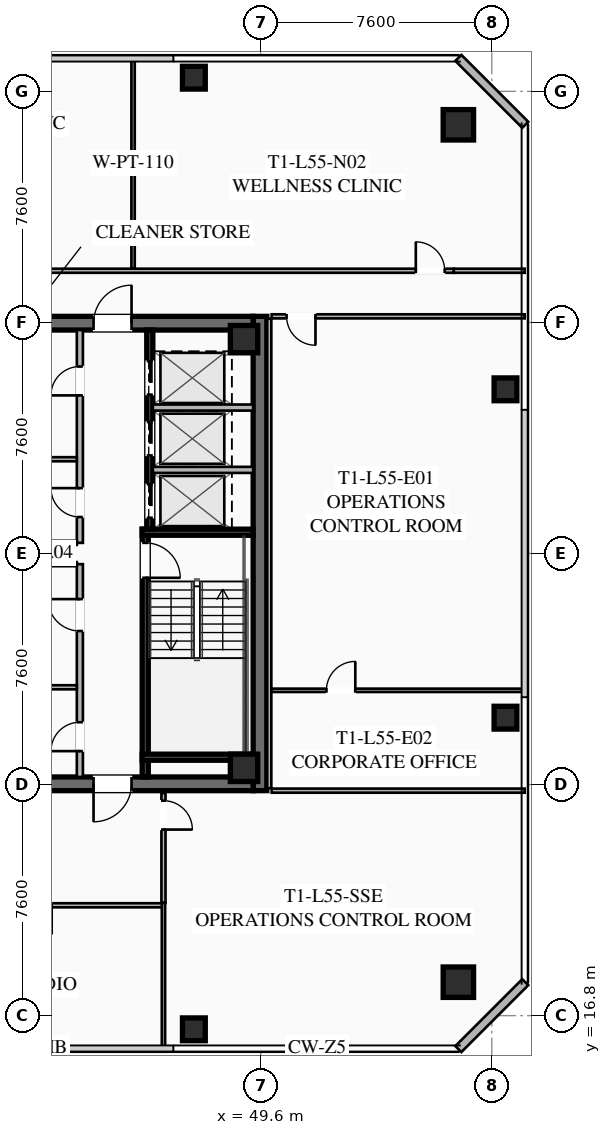
"""IFC4 building model, lengths in metres.
Left out: names, types, materials, properties, quantities, classifications, styles, units other than length and angle.
Written with IfcOpenShell. Run it as: python <this file> out.ifc"""

import sys

from ifc_helpers import new_model, si_unit, direction, frame, frame_2d, origin, origin_2d, place, context, subcontext, project, spatial, rectangle, hollow_rectangle, extrude, element, fill, save


model = new_model("IFC4")
c1 = context("Model", 3, precision=1e-05, world=origin(), true_north=direction((0.0, 1.0)))
c2 = subcontext(c1, "Body", "Model", "MODEL_VIEW")
j1 = project(units=[si_unit("LENGTHUNIT", "METRE"), si_unit("PLANEANGLEUNIT", "RADIAN")], contexts=[c1])
p1 = place(None, origin())
s1 = spatial("IfcSite", under=j1, at=p1, CompositionType="ELEMENT")
p2 = place(p1, origin())
s2 = spatial("IfcBuilding", under=s1, at=p2, CompositionType="ELEMENT")
p3 = place(p2, frame((0.0, 0.0, 204.2)))
s3 = spatial("IfcBuildingStorey", under=s2, at=p3, CompositionType="ELEMENT", Elevation=204.2)
p4 = place(p3, frame((49.575, 39.8, 0.0), z_axis=(0.0, 0.0, 1.0), x_axis=(0.0, -1.0, 0.0)))
e1 = element("IfcWall", 1, at=p4, inside=s3, PredefinedType="SHEAR", context=c2, shape_type="SweptSolid", body=[
    extrude(rectangle(XDim=15.6, YDim=0.45, at=frame_2d((7.8, 0.0))), origin(), (0.0, 0.0, 1.0), 3.55),
])
p5 = place(p3, frame((49.35, 24.425, 0.0), z_axis=(0.0, 0.0, 1.0), x_axis=(-1.0, 0.0, 0.0)))
e2 = element("IfcWall", 2, at=p5, inside=s3, PredefinedType="SHEAR", context=c2, shape_type="SweptSolid", body=[
    extrude(rectangle(XDim=14.7, YDim=0.45, at=frame_2d((7.35, 0.0))), origin(), (0.0, 0.0, 1.0), 3.55),
])
p6 = place(p5, frame((9.05, 0.0, 0.0)))
e3 = element("IfcOpeningElement", 3, at=p6, cuts=e2, PredefinedType="OPENING", context=c2, shape_type="SweptSolid", body=[
    extrude(rectangle(XDim=1.25, YDim=2.25, at=frame_2d((0.625, 1.125))), frame((0.0, 0.235, 0.0), z_axis=(0.0, -1.0, 0.0), x_axis=(1.0, 0.0, 0.0)), (0.0, 0.0, 1.0), 0.47),
])
p7 = place(p5, frame((4.0, 0.0, 0.0)))
e4 = element("IfcOpeningElement", 4, at=p7, cuts=e2, PredefinedType="OPENING", context=c2, shape_type="SweptSolid", body=[
    extrude(rectangle(XDim=1.25, YDim=2.25, at=frame_2d((0.625, 1.125))), frame((0.0, 0.235, 0.0), z_axis=(0.0, -1.0, 0.0), x_axis=(1.0, 0.0, 0.0)), (0.0, 0.0, 1.0), 0.47),
])
p8 = place(p3, frame((34.65, 39.575, 0.0), z_axis=(0.0, 0.0, 1.0), x_axis=(1.0, 0.0, 0.0)))
e5 = element("IfcWall", 5, at=p8, inside=s3, PredefinedType="SHEAR", context=c2, shape_type="SweptSolid", body=[
    extrude(rectangle(XDim=14.7, YDim=0.45, at=frame_2d((7.35, 0.0))), origin(), (0.0, 0.0, 1.0), 3.55),
])
p9 = place(p8, frame((4.4, 0.0, 0.0)))
e6 = element("IfcOpeningElement", 6, at=p9, cuts=e5, PredefinedType="OPENING", context=c2, shape_type="SweptSolid", body=[
    extrude(rectangle(XDim=1.25, YDim=2.25, at=frame_2d((0.625, 1.125))), frame((0.0, 0.235, 0.0), z_axis=(0.0, -1.0, 0.0), x_axis=(1.0, 0.0, 0.0)), (0.0, 0.0, 1.0), 0.47),
])
p10 = place(p8, frame((9.45, 0.0, 0.0)))
e7 = element("IfcOpeningElement", 7, at=p10, cuts=e5, PredefinedType="OPENING", context=c2, shape_type="SweptSolid", body=[
    extrude(rectangle(XDim=1.25, YDim=2.25, at=frame_2d((0.625, 1.125))), frame((0.0, 0.235, 0.0), z_axis=(0.0, -1.0, 0.0), x_axis=(1.0, 0.0, 0.0)), (0.0, 0.0, 1.0), 0.47),
])
for number, where, z_axis, x_axis in (
    (8, (49.05, 24.95, 0.0), (0.0, 0.0, 1.0), (1.0, 0.0, 0.0)),
    (9, (49.05, 39.05, 0.0), (0.0, 0.0, 1.0), (1.0, 0.0, 0.0)),
):
    element("IfcColumn", number, at=place(p3, frame(where, z_axis=z_axis, x_axis=x_axis)), inside=s3, PredefinedType="COLUMN", context=c2, shape_type="SweptSolid", body=[
        extrude(hollow_rectangle(XDim=0.9, YDim=0.9, WallThickness=0.04, at=origin_2d()), origin(), (0.0, 0.0, 1.0), 3.37),
    ])
for number, where, z_axis, x_axis in (
    (10, (56.1, 17.9, 0.0), (0.0, 0.0, 1.0), (1.0, 0.0, 0.0)),
    (11, (56.1, 46.1, 0.0), (0.0, 0.0, 1.0), (1.0, 0.0, 0.0)),
):
    element("IfcColumn", number, at=place(p3, frame(where, z_axis=z_axis, x_axis=x_axis)), inside=s3, PredefinedType="COLUMN", context=c2, shape_type="SweptSolid", body=[
        extrude(hollow_rectangle(XDim=1.0, YDim=1.0, WallThickness=0.04, at=origin_2d()), origin(), (0.0, 0.0, 1.0), 3.37),
    ])
for number, where, z_axis, x_axis in (
    (12, (47.4, 16.35, 0.0), (0.0, 0.0, 1.0), (1.0, 0.0, 0.0)),
    (13, (57.65, 26.6, 0.0), (0.0, 0.0, 1.0), (1.0, 0.0, 0.0)),
    (14, (57.65, 37.4, 0.0), (0.0, 0.0, 1.0), (1.0, 0.0, 0.0)),
    (15, (47.4, 47.65, 0.0), (0.0, 0.0, 1.0), (1.0, 0.0, 0.0)),
):
    element("IfcColumn", number, at=place(p3, frame(where, z_axis=z_axis, x_axis=x_axis)), inside=s3, PredefinedType="COLUMN", context=c2, shape_type="SweptSolid", body=[
        extrude(hollow_rectangle(XDim=0.75, YDim=0.75, WallThickness=0.032, at=origin_2d()), origin(), (0.0, 0.0, 1.0), 3.37),
    ])
for number, where, z_axis, x_axis in (
    (16, (56.1, 48.3, 0.0), (0.0, 0.0, 1.0), (0.707, -0.707, 0.0)),
    (17, (58.3, 17.9, 0.0), (0.0, 0.0, 1.0), (-0.707, -0.707, 0.0)),
):
    element("IfcWall", number, at=place(p3, frame(where, z_axis=z_axis, x_axis=x_axis)), inside=s3, PredefinedType="SOLIDWALL", context=c2, shape_type="SweptSolid", body=[
        extrude(rectangle(XDim=3.111, YDim=0.28, at=frame_2d((1.556, 0.0))), origin(), (0.0, 0.0, 1.0), 3.37),
    ])
p11 = place(p3, frame((45.8, 32.8, 0.0), z_axis=(0.0, 0.0, 1.0), x_axis=(0.0, -1.0, 0.0)))
e18 = element("IfcWall", 18, at=p11, inside=s3, PredefinedType="SHEAR", context=c2, shape_type="SweptSolid", body=[
    extrude(rectangle(XDim=8.15, YDim=0.2, at=frame_2d((4.075, 0.0))), origin(), (0.0, 0.0, 1.0), 3.37),
])
p12 = place(p11, frame((0.45, 0.0, 0.0)))
e19 = element("IfcOpeningElement", 19, at=p12, cuts=e18, PredefinedType="OPENING", context=c2, shape_type="SweptSolid", body=[
    extrude(rectangle(XDim=1.15, YDim=2.2, at=frame_2d((0.575, 1.1))), frame((0.0, 0.11, 0.0), z_axis=(0.0, -1.0, 0.0), x_axis=(1.0, 0.0, 0.0)), (0.0, 0.0, 1.0), 0.22),
])
for number, where, z_axis, x_axis in (
    (20, (45.7, 32.7, 0.0), (0.0, 0.0, 1.0), (1.0, 0.0, 0.0)),
    (21, (45.7, 25.3, 0.0), (0.0, 0.0, 1.0), (1.0, 0.0, 0.0)),
):
    element("IfcWall", number, at=place(p3, frame(where, z_axis=z_axis, x_axis=x_axis)), inside=s3, PredefinedType="SHEAR", context=c2, shape_type="SweptSolid", body=[
        extrude(rectangle(XDim=3.65, YDim=0.2, at=frame_2d((1.825, 0.0))), origin(), (0.0, 0.0, 1.0), 3.37),
    ])
p13 = place(p3, frame((45.95, 39.35, 0.0), z_axis=(0.0, 0.0, 1.0), x_axis=(0.0, -1.0, 0.0)))
e22 = element("IfcWall", 22, at=p13, inside=s3, PredefinedType="SHEAR", context=c2, shape_type="SweptSolid", body=[
    extrude(rectangle(XDim=6.55, YDim=0.2, at=frame_2d((3.275, 0.0))), origin(), (0.0, 0.0, 1.0), 3.37),
])
p14 = place(p13, frame((5.075, 0.0, 0.0)))
e23 = element("IfcOpeningElement", 23, at=p14, cuts=e22, PredefinedType="OPENING", context=c2, shape_type="SweptSolid", body=[
    extrude(rectangle(XDim=1.1, YDim=2.2, at=frame_2d((0.55, 1.1))), frame((0.0, 0.11, 0.0), z_axis=(0.0, -1.0, 0.0), x_axis=(1.0, 0.0, 0.0)), (0.0, 0.0, 1.0), 0.22),
])
p15 = place(p13, frame((3.025, 0.0, 0.0)))
e24 = element("IfcOpeningElement", 24, at=p15, cuts=e22, PredefinedType="OPENING", context=c2, shape_type="SweptSolid", body=[
    extrude(rectangle(XDim=1.1, YDim=2.2, at=frame_2d((0.55, 1.1))), frame((0.0, 0.11, 0.0), z_axis=(0.0, -1.0, 0.0), x_axis=(1.0, 0.0, 0.0)), (0.0, 0.0, 1.0), 0.22),
])
p16 = place(p13, frame((1.025, 0.0, 0.0)))
e25 = element("IfcOpeningElement", 25, at=p16, cuts=e22, PredefinedType="OPENING", context=c2, shape_type="SweptSolid", body=[
    extrude(rectangle(XDim=1.1, YDim=2.2, at=frame_2d((0.55, 1.1))), frame((0.0, 0.11, 0.0), z_axis=(0.0, -1.0, 0.0), x_axis=(1.0, 0.0, 0.0)), (0.0, 0.0, 1.0), 0.22),
])
for number, where, z_axis, x_axis in (
    (26, (46.05, 34.75, 0.0), (0.0, 0.0, 1.0), (1.0, 0.0, 0.0)),
    (27, (46.05, 36.8, 0.0), (0.0, 0.0, 1.0), (1.0, 0.0, 0.0)),
):
    element("IfcWall", number, at=place(p3, frame(where, z_axis=z_axis, x_axis=x_axis)), inside=s3, PredefinedType="SOLIDWALL", context=c2, shape_type="SweptSolid", body=[
        extrude(rectangle(XDim=3.3, YDim=0.2, at=frame_2d((1.65, 0.0))), origin(), (0.0, 0.0, 1.0), 3.37),
    ])
p17 = place(p3, frame((43.65, 24.65, 0.0), z_axis=(0.0, 0.0, 1.0), x_axis=(0.0, 1.0, 0.0)))
e28 = element("IfcWall", 28, at=p17, inside=s3, PredefinedType="SOLIDWALL", context=c2, shape_type="SweptSolid", body=[
    extrude(rectangle(XDim=7.0, YDim=0.2, at=frame_2d((3.5, 0.0))), origin(), (0.0, 0.0, 1.0), 2.723),
])
p18 = place(p17, frame((0.85, 0.0, 0.0)))
e29 = element("IfcOpeningElement", 29, at=p18, cuts=e28, PredefinedType="OPENING", context=c2, shape_type="SweptSolid", body=[
    extrude(rectangle(XDim=0.95, YDim=2.05, at=frame_2d((0.475, 1.025))), frame((0.0, 0.11, 0.0), z_axis=(0.0, -1.0, 0.0), x_axis=(1.0, 0.0, 0.0)), (0.0, 0.0, 1.0), 0.22),
])
p19 = place(p17, frame((4.8, 0.0, 0.0)))
e30 = element("IfcOpeningElement", 30, at=p19, cuts=e28, PredefinedType="OPENING", context=c2, shape_type="SweptSolid", body=[
    extrude(rectangle(XDim=1.05, YDim=2.2, at=frame_2d((0.525, 1.1))), frame((0.0, 0.11, 0.0), z_axis=(0.0, -1.0, 0.0), x_axis=(1.0, 0.0, 0.0)), (0.0, 0.0, 1.0), 0.22),
])
for number, where, z_axis, x_axis in (
    (31, (41.67, 31.65, 0.0), (0.0, 0.0, 1.0), (1.0, 0.0, 0.0)),
    (32, (41.67, 27.6, 0.0), (0.0, 0.0, 1.0), (1.0, 0.0, 0.0)),
):
    element("IfcWall", number, at=place(p3, frame(where, z_axis=z_axis, x_axis=x_axis)), inside=s3, PredefinedType="PARTITIONING", context=c2, shape_type="SweptSolid", body=[
        extrude(rectangle(XDim=1.88, YDim=0.135, at=frame_2d((0.94, 0.0))), origin(), (0.0, 0.0, 1.0), 2.723),
    ])
p20 = place(p3, frame((43.65, 32.35, 0.0), z_axis=(0.0, 0.0, 1.0), x_axis=(0.0, 1.0, 0.0)))
e33 = element("IfcWall", 33, at=p20, inside=s3, PredefinedType="SOLIDWALL", context=c2, shape_type="SweptSolid", body=[
    extrude(rectangle(XDim=7.0, YDim=0.2, at=frame_2d((3.5, 0.0))), origin(), (0.0, 0.0, 1.0), 2.723),
])
p21 = place(p20, frame((0.85, 0.0, 0.0)))
e34 = element("IfcOpeningElement", 34, at=p21, cuts=e33, PredefinedType="OPENING", context=c2, shape_type="SweptSolid", body=[
    extrude(rectangle(XDim=0.95, YDim=2.05, at=frame_2d((0.475, 1.025))), frame((0.0, 0.11, 0.0), z_axis=(0.0, -1.0, 0.0), x_axis=(1.0, 0.0, 0.0)), (0.0, 0.0, 1.0), 0.22),
])
p22 = place(p20, frame((4.85, 0.0, 0.0)))
e35 = element("IfcOpeningElement", 35, at=p22, cuts=e33, PredefinedType="OPENING", context=c2, shape_type="SweptSolid", body=[
    extrude(rectangle(XDim=0.95, YDim=2.05, at=frame_2d((0.475, 1.025))), frame((0.0, 0.11, 0.0), z_axis=(0.0, -1.0, 0.0), x_axis=(1.0, 0.0, 0.0)), (0.0, 0.0, 1.0), 0.22),
])
for number, where, z_axis, x_axis in (
    (36, (41.67, 32.35, 0.0), (0.0, 0.0, 1.0), (1.0, 0.0, 0.0)),
    (37, (41.67, 35.1, 0.0), (0.0, 0.0, 1.0), (1.0, 0.0, 0.0)),
):
    element("IfcWall", number, at=place(p3, frame(where, z_axis=z_axis, x_axis=x_axis)), inside=s3, PredefinedType="PARTITIONING", context=c2, shape_type="SweptSolid", body=[
        extrude(rectangle(XDim=1.88, YDim=0.135, at=frame_2d((0.94, 0.0))), origin(), (0.0, 0.0, 1.0), 2.723),
    ])
p23 = place(p3, frame((28.05, 41.3, 0.0), z_axis=(0.0, 0.0, 1.0), x_axis=(1.0, 0.0, 0.0)))
e38 = element("IfcWall", 38, at=p23, inside=s3, PredefinedType="PARTITIONING", context=c2, shape_type="SweptSolid", body=[
    extrude(rectangle(XDim=27.9, YDim=0.135, at=frame_2d((13.95, 0.0))), origin(), (0.0, 0.0, 1.0), 2.723),
])
p24 = place(p23, frame((0.3, 0.0, 0.0)))
e39 = element("IfcOpeningElement", 39, at=p24, cuts=e38, PredefinedType="OPENING", context=c2, shape_type="SweptSolid", body=[
    extrude(rectangle(XDim=0.95, YDim=2.05, at=frame_2d((0.475, 1.025))), frame((0.0, 0.077, 0.0), z_axis=(0.0, -1.0, 0.0), x_axis=(1.0, 0.0, 0.0)), (0.0, 0.0, 1.0), 0.155),
])
p25 = place(p23, frame((26.65, 0.0, 0.0)))
e40 = element("IfcOpeningElement", 40, at=p25, cuts=e38, PredefinedType="OPENING", context=c2, shape_type="SweptSolid", body=[
    extrude(rectangle(XDim=0.95, YDim=2.05, at=frame_2d((0.475, 1.025))), frame((0.0, 0.077, 0.0), z_axis=(0.0, -1.0, 0.0), x_axis=(1.0, 0.0, 0.0)), (0.0, 0.0, 1.0), 0.155),
])
p26 = place(p3, frame((55.95, 41.3, 0.0), z_axis=(0.0, 0.0, 1.0), x_axis=(1.0, 0.0, 0.0)))
e41 = element("IfcWall", 41, at=p26, inside=s3, PredefinedType="PARTITIONING", context=c2, shape_type="SweptSolid", body=[
    extrude(rectangle(XDim=2.33, YDim=0.135, at=frame_2d((1.165, 0.0))), origin(), (0.0, 0.0, 1.0), 2.723),
])
p27 = place(p3, frame((45.4, 41.38, 0.0), z_axis=(0.0, 0.0, 1.0), x_axis=(0.0, 1.0, 0.0)))
e42 = element("IfcWall", 42, at=p27, inside=s3, PredefinedType="PARTITIONING", context=c2, shape_type="SweptSolid", body=[
    extrude(rectangle(XDim=6.9, YDim=0.11, at=frame_2d((3.45, 0.0))), origin(), (0.0, 0.0, 1.0), 2.723),
])
p28 = place(p3, frame((46.4, 20.43, 0.0), z_axis=(0.0, 0.0, 1.0), x_axis=(-1.0, 0.0, 0.0)))
e43 = element("IfcWall", 43, at=p28, inside=s3, PredefinedType="PARTITIONING", context=c2, shape_type="SweptSolid", body=[
    extrude(rectangle(XDim=18.35, YDim=0.135, at=frame_2d((9.175, 0.0))), origin(), (0.0, 0.0, 1.0), 2.723),
])
p29 = place(p28, frame((17.02, 0.0, 0.0)))
e44 = element("IfcOpeningElement", 44, at=p29, cuts=e43, PredefinedType="OPENING", context=c2, shape_type="SweptSolid", body=[
    extrude(rectangle(XDim=0.95, YDim=2.05, at=frame_2d((0.475, 1.025))), frame((0.0, 0.077, 0.0), z_axis=(0.0, -1.0, 0.0), x_axis=(1.0, 0.0, 0.0)), (0.0, 0.0, 1.0), 0.155),
])
p30 = place(p28, frame((3.677, 0.0, 0.0)))
e45 = element("IfcOpeningElement", 45, at=p30, cuts=e43, PredefinedType="OPENING", context=c2, shape_type="SweptSolid", body=[
    extrude(rectangle(XDim=0.95, YDim=2.05, at=frame_2d((0.475, 1.025))), frame((0.0, 0.077, 0.0), z_axis=(0.0, -1.0, 0.0), x_axis=(1.0, 0.0, 0.0)), (0.0, 0.0, 1.0), 0.155),
])
p31 = place(p3, frame((46.4, 24.12, 0.0), z_axis=(0.0, 0.0, 1.0), x_axis=(0.0, -1.0, 0.0)))
e46 = element("IfcWall", 46, at=p31, inside=s3, PredefinedType="PARTITIONING", context=c2, shape_type="SweptSolid", body=[
    extrude(rectangle(XDim=3.61, YDim=0.135, at=frame_2d((1.805, 0.0))), origin(), (0.0, 0.0, 1.0), 2.723),
])
p32 = place(p31, frame((0.25, 0.0, 0.0)))
e47 = element("IfcOpeningElement", 47, at=p32, cuts=e46, PredefinedType="OPENING", context=c2, shape_type="SweptSolid", body=[
    extrude(rectangle(XDim=0.95, YDim=2.05, at=frame_2d((0.475, 1.025))), frame((0.0, 0.077, 0.0), z_axis=(0.0, -1.0, 0.0), x_axis=(1.0, 0.0, 0.0)), (0.0, 0.0, 1.0), 0.155),
])
p33 = place(p3, frame((46.4, 15.72, 0.0), z_axis=(0.0, 0.0, 1.0), x_axis=(0.0, 1.0, 0.0)))
e48 = element("IfcWall", 48, at=p33, inside=s3, PredefinedType="PARTITIONING", context=c2, shape_type="SweptSolid", body=[
    extrude(rectangle(XDim=4.79, YDim=0.11, at=frame_2d((2.395, 0.0))), origin(), (0.0, 0.0, 1.0), 2.723),
])
p34 = place(p3, frame((49.88, 39.72, 0.0), z_axis=(0.0, 0.0, 1.0), x_axis=(0.0, -1.0, 0.0)))
e49 = element("IfcWall", 49, at=p34, inside=s3, PredefinedType="PARTITIONING", context=c2, shape_type="SweptSolid", body=[
    extrude(rectangle(XDim=15.44, YDim=0.135, at=frame_2d((7.72, 0.0))), origin(), (0.0, 0.0, 1.0), 2.723),
])
p35 = place(p3, frame((58.28, 39.8, 0.0), z_axis=(0.0, 0.0, 1.0), x_axis=(-1.0, 0.0, 0.0)))
e50 = element("IfcWall", 50, at=p35, inside=s3, PredefinedType="PARTITIONING", context=c2, shape_type="SweptSolid", body=[
    extrude(rectangle(XDim=8.32, YDim=0.135, at=frame_2d((4.16, 0.0))), origin(), (0.0, 0.0, 1.0), 2.723),
])
p36 = place(p35, frame((6.88, 0.0, 0.0)))
e51 = element("IfcOpeningElement", 51, at=p36, cuts=e50, PredefinedType="OPENING", context=c2, shape_type="SweptSolid", body=[
    extrude(rectangle(XDim=0.95, YDim=2.05, at=frame_2d((0.475, 1.025))), frame((0.0, 0.077, 0.0), z_axis=(0.0, -1.0, 0.0), x_axis=(1.0, 0.0, 0.0)), (0.0, 0.0, 1.0), 0.155),
])
p37 = place(p3, frame((49.96, 24.2, 0.0), z_axis=(0.0, 0.0, 1.0), x_axis=(1.0, 0.0, 0.0)))
e52 = element("IfcWall", 52, at=p37, inside=s3, PredefinedType="PARTITIONING", context=c2, shape_type="SweptSolid", body=[
    extrude(rectangle(XDim=8.32, YDim=0.135, at=frame_2d((4.16, 0.0))), origin(), (0.0, 0.0, 1.0), 2.723),
])
p38 = place(p3, frame((49.96, 27.5, 0.0), z_axis=(0.0, 0.0, 1.0), x_axis=(1.0, 0.0, 0.0)))
e53 = element("IfcWall", 53, at=p38, inside=s3, PredefinedType="PARTITIONING", context=c2, shape_type="SweptSolid", body=[
    extrude(rectangle(XDim=8.32, YDim=0.11, at=frame_2d((4.16, 0.0))), origin(), (0.0, 0.0, 1.0), 2.723),
])
p39 = place(p38, frame((1.8, 0.0, 0.0)))
e54 = element("IfcOpeningElement", 54, at=p39, cuts=e53, PredefinedType="OPENING", context=c2, shape_type="SweptSolid", body=[
    extrude(rectangle(XDim=0.95, YDim=2.05, at=frame_2d((0.475, 1.025))), frame((0.0, 0.065, 0.0), z_axis=(0.0, -1.0, 0.0), x_axis=(1.0, 0.0, 0.0)), (0.0, 0.0, 1.0), 0.13),
])
p40 = place(p10, origin())
e55 = element("IfcDoor", 55, at=p40, inside=s3, OperationType="SINGLE_SWING_RIGHT", PredefinedType="DOOR", context=c2, shape_type="SweptSolid", body=[
    extrude(rectangle(XDim=1.25, YDim=2.25, at=frame_2d((0.625, 1.125))), frame((0.0, 0.025, 0.0), z_axis=(0.0, -1.0, 0.0), x_axis=(1.0, 0.0, 0.0)), (0.0, 0.0, 1.0), 0.05),
])
fill(e7, e55)
p41 = place(p7, origin())
e56 = element("IfcDoor", 56, at=p41, inside=s3, OperationType="SINGLE_SWING_RIGHT", PredefinedType="DOOR", context=c2, shape_type="SweptSolid", body=[
    extrude(rectangle(XDim=1.25, YDim=2.25, at=frame_2d((0.625, 1.125))), frame((0.0, 0.025, 0.0), z_axis=(0.0, -1.0, 0.0), x_axis=(1.0, 0.0, 0.0)), (0.0, 0.0, 1.0), 0.05),
])
fill(e4, e56)
p42 = place(p12, origin())
e57 = element("IfcDoor", 57, at=p42, inside=s3, OperationType="SINGLE_SWING_RIGHT", PredefinedType="DOOR", context=c2, shape_type="SweptSolid", body=[
    extrude(rectangle(XDim=1.15, YDim=2.2, at=frame_2d((0.575, 1.1))), frame((0.0, 0.025, 0.0), z_axis=(0.0, -1.0, 0.0), x_axis=(1.0, 0.0, 0.0)), (0.0, 0.0, 1.0), 0.05),
])
fill(e19, e57)
p43 = place(p18, origin())
e58 = element("IfcDoor", 58, at=p43, inside=s3, OperationType="SINGLE_SWING_LEFT", PredefinedType="DOOR", context=c2, shape_type="SweptSolid", body=[
    extrude(rectangle(XDim=0.95, YDim=2.05, at=frame_2d((0.475, 1.025))), frame((0.0, 0.025, 0.0), z_axis=(0.0, -1.0, 0.0), x_axis=(1.0, 0.0, 0.0)), (0.0, 0.0, 1.0), 0.05),
])
fill(e29, e58)
p44 = place(p19, origin())
e59 = element("IfcDoor", 59, at=p44, inside=s3, OperationType="SINGLE_SWING_RIGHT", PredefinedType="DOOR", context=c2, shape_type="SweptSolid", body=[
    extrude(rectangle(XDim=1.05, YDim=2.2, at=frame_2d((0.525, 1.1))), frame((0.0, 0.025, 0.0), z_axis=(0.0, -1.0, 0.0), x_axis=(1.0, 0.0, 0.0)), (0.0, 0.0, 1.0), 0.05),
])
fill(e30, e59)
p45 = place(p21, origin())
e60 = element("IfcDoor", 60, at=p45, inside=s3, OperationType="SINGLE_SWING_RIGHT", PredefinedType="DOOR", context=c2, shape_type="SweptSolid", body=[
    extrude(rectangle(XDim=0.95, YDim=2.05, at=frame_2d((0.475, 1.025))), frame((0.0, 0.025, 0.0), z_axis=(0.0, -1.0, 0.0), x_axis=(1.0, 0.0, 0.0)), (0.0, 0.0, 1.0), 0.05),
])
fill(e34, e60)
p46 = place(p22, origin())
e61 = element("IfcDoor", 61, at=p46, inside=s3, OperationType="SINGLE_SWING_LEFT", PredefinedType="DOOR", context=c2, shape_type="SweptSolid", body=[
    extrude(rectangle(XDim=0.95, YDim=2.05, at=frame_2d((0.475, 1.025))), frame((0.0, 0.025, 0.0), z_axis=(0.0, -1.0, 0.0), x_axis=(1.0, 0.0, 0.0)), (0.0, 0.0, 1.0), 0.05),
])
fill(e35, e61)
p47 = place(p25, origin())
e62 = element("IfcDoor", 62, at=p47, inside=s3, OperationType="SINGLE_SWING_LEFT", PredefinedType="DOOR", context=c2, shape_type="SweptSolid", body=[
    extrude(rectangle(XDim=0.95, YDim=2.05, at=frame_2d((0.475, 1.025))), frame((0.0, 0.025, 0.0), z_axis=(0.0, -1.0, 0.0), x_axis=(1.0, 0.0, 0.0)), (0.0, 0.0, 1.0), 0.05),
])
fill(e40, e62)
p48 = place(p32, origin())
e63 = element("IfcDoor", 63, at=p48, inside=s3, OperationType="SINGLE_SWING_RIGHT", PredefinedType="DOOR", context=c2, shape_type="SweptSolid", body=[
    extrude(rectangle(XDim=0.95, YDim=2.05, at=frame_2d((0.475, 1.025))), frame((0.0, 0.025, 0.0), z_axis=(0.0, -1.0, 0.0), x_axis=(1.0, 0.0, 0.0)), (0.0, 0.0, 1.0), 0.05),
])
fill(e47, e63)
p49 = place(p36, origin())
e64 = element("IfcDoor", 64, at=p49, inside=s3, OperationType="SINGLE_SWING_LEFT", PredefinedType="DOOR", context=c2, shape_type="SweptSolid", body=[
    extrude(rectangle(XDim=0.95, YDim=2.05, at=frame_2d((0.475, 1.025))), frame((0.0, 0.025, 0.0), z_axis=(0.0, -1.0, 0.0), x_axis=(1.0, 0.0, 0.0)), (0.0, 0.0, 1.0), 0.05),
])
fill(e51, e64)
p50 = place(p39, origin())
e65 = element("IfcDoor", 65, at=p50, inside=s3, OperationType="SINGLE_SWING_RIGHT", PredefinedType="DOOR", context=c2, shape_type="SweptSolid", body=[
    extrude(rectangle(XDim=0.95, YDim=2.05, at=frame_2d((0.475, 1.025))), frame((0.0, 0.025, 0.0), z_axis=(0.0, -1.0, 0.0), x_axis=(1.0, 0.0, 0.0)), (0.0, 0.0, 1.0), 0.05),
])
fill(e54, e65)
p51 = place(p14, origin())
e66 = element("IfcDoor", 66, at=p51, inside=s3, OperationType="SLIDING_TO_LEFT", PredefinedType="DOOR", context=c2, shape_type="SweptSolid", body=[
    extrude(rectangle(XDim=1.1, YDim=2.2, at=frame_2d((0.55, 1.1))), frame((0.0, 0.025, 0.0), z_axis=(0.0, -1.0, 0.0), x_axis=(1.0, 0.0, 0.0)), (0.0, 0.0, 1.0), 0.05),
])
fill(e23, e66)
p52 = place(p15, origin())
e67 = element("IfcDoor", 67, at=p52, inside=s3, OperationType="SLIDING_TO_LEFT", PredefinedType="DOOR", context=c2, shape_type="SweptSolid", body=[
    extrude(rectangle(XDim=1.1, YDim=2.2, at=frame_2d((0.55, 1.1))), frame((0.0, 0.025, 0.0), z_axis=(0.0, -1.0, 0.0), x_axis=(1.0, 0.0, 0.0)), (0.0, 0.0, 1.0), 0.05),
])
fill(e24, e67)
p53 = place(p16, origin())
e68 = element("IfcDoor", 68, at=p53, inside=s3, OperationType="SLIDING_TO_LEFT", PredefinedType="DOOR", context=c2, shape_type="SweptSolid", body=[
    extrude(rectangle(XDim=1.1, YDim=2.2, at=frame_2d((0.55, 1.1))), frame((0.0, 0.025, 0.0), z_axis=(0.0, -1.0, 0.0), x_axis=(1.0, 0.0, 0.0)), (0.0, 0.0, 1.0), 0.05),
])
fill(e25, e68)
save(model, sys.argv[1])
